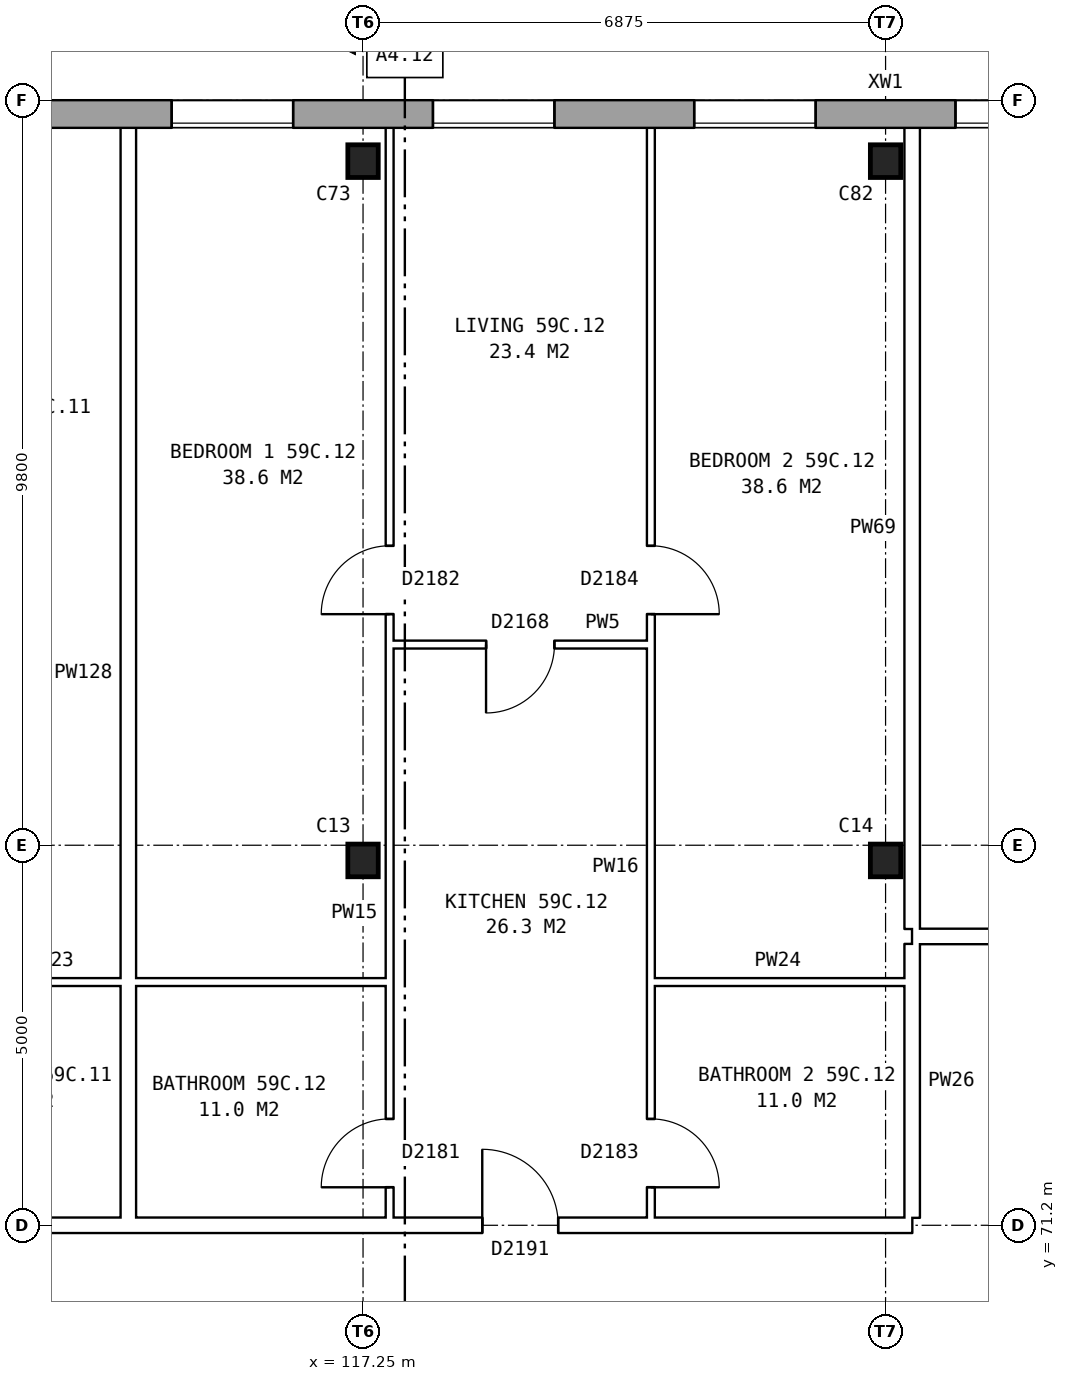
"""IFC4 building model, lengths in metres.
Left out: names, types, materials, properties, quantities, classifications, styles, units other than length and angle.
Written with IfcOpenShell. Run it as: python <this file> out.ifc"""

import sys

from ifc_helpers import new_model, si_unit, direction, frame, frame_2d, origin, origin_2d, place, context, subcontext, project, spatial, rectangle, i_section, extrude, element, fill, save


model = new_model("IFC4")
c1 = context("Model", 3, precision=1e-05, world=origin(), true_north=direction((0.0, 1.0)))
c2 = subcontext(c1, "Body", "Model", "MODEL_VIEW")
j1 = project(units=[si_unit("LENGTHUNIT", "METRE"), si_unit("PLANEANGLEUNIT", "RADIAN")], contexts=[c1])
p1 = place(None, origin())
s1 = spatial("IfcSite", under=j1, at=p1, CompositionType="ELEMENT")
p2 = place(p1, origin())
s2 = spatial("IfcBuilding", under=s1, at=p2, CompositionType="ELEMENT")
p3 = place(p2, frame((0.0, 0.0, 209.0)))
s3 = spatial("IfcBuildingStorey", under=s2, at=p3, CompositionType="ELEMENT", Elevation=209.0)
for number, where, z_axis, x_axis in (
    (1, (117.25, 76.0, 0.0), (0.0, 0.0, 1.0), (1.0, 0.0, 0.0)),
    (2, (124.125, 76.0, 0.0), (0.0, 0.0, 1.0), (1.0, 0.0, 0.0)),
    (3, (117.25, 85.2, 0.0), (0.0, 0.0, 1.0), (1.0, 0.0, 0.0)),
    (4, (124.125, 85.2, 0.0), (0.0, 0.0, 1.0), (1.0, 0.0, 0.0)),
):
    element("IfcColumn", number, at=place(p3, frame(where, z_axis=z_axis, x_axis=x_axis)), inside=s3, PredefinedType="COLUMN", context=c2, shape_type="SweptSolid", body=[
        extrude(i_section(OverallWidth=0.4, OverallDepth=0.43, WebThickness=0.04, FlangeThickness=0.04, at=origin_2d()), origin(), (0.0, 0.0, 1.0), 2.85),
    ])
p4 = place(p3, frame((131.05, 85.82, 0.0), z_axis=(0.0, 0.0, 1.0), x_axis=(-1.0, 0.0, 0.0)))
e5 = element("IfcWall", 5, at=p4, inside=s3, PredefinedType="STANDARD", context=c2, shape_type="SweptSolid", body=[
    extrude(rectangle(XDim=55.1, YDim=0.36, at=frame_2d((27.55, 0.0))), origin(), (0.0, 0.0, 1.0), 2.85),
])
p5 = place(p4, frame((0.969, 0.0, 0.8)))
e6 = element("IfcOpeningElement", 6, at=p5, cuts=e5, PredefinedType="OPENING", context=c2, shape_type="SweptSolid", body=[
    extrude(rectangle(XDim=1.6, YDim=1.8, at=frame_2d((0.8, 0.9))), frame((0.0, 0.19, 0.0), z_axis=(0.0, -1.0, 0.0), x_axis=(1.0, 0.0, 0.0)), (0.0, 0.0, 1.0), 0.38),
])
p6 = place(p4, frame((4.406, 0.0, 0.8)))
e7 = element("IfcOpeningElement", 7, at=p6, cuts=e5, PredefinedType="OPENING", context=c2, shape_type="SweptSolid", body=[
    extrude(rectangle(XDim=1.6, YDim=1.8, at=frame_2d((0.8, 0.9))), frame((0.0, 0.19, 0.0), z_axis=(0.0, -1.0, 0.0), x_axis=(1.0, 0.0, 0.0)), (0.0, 0.0, 1.0), 0.38),
])
p7 = place(p4, frame((7.844, 0.0, 0.8)))
e8 = element("IfcOpeningElement", 8, at=p7, cuts=e5, PredefinedType="OPENING", context=c2, shape_type="SweptSolid", body=[
    extrude(rectangle(XDim=1.6, YDim=1.8, at=frame_2d((0.8, 0.9))), frame((0.0, 0.19, 0.0), z_axis=(0.0, -1.0, 0.0), x_axis=(1.0, 0.0, 0.0)), (0.0, 0.0, 1.0), 0.38),
])
p8 = place(p4, frame((11.281, 0.0, 0.8)))
e9 = element("IfcOpeningElement", 9, at=p8, cuts=e5, PredefinedType="OPENING", context=c2, shape_type="SweptSolid", body=[
    extrude(rectangle(XDim=1.6, YDim=1.8, at=frame_2d((0.8, 0.9))), frame((0.0, 0.19, 0.0), z_axis=(0.0, -1.0, 0.0), x_axis=(1.0, 0.0, 0.0)), (0.0, 0.0, 1.0), 0.38),
])
p9 = place(p4, frame((14.719, 0.0, 0.8)))
e10 = element("IfcOpeningElement", 10, at=p9, cuts=e5, PredefinedType="OPENING", context=c2, shape_type="SweptSolid", body=[
    extrude(rectangle(XDim=1.6, YDim=1.8, at=frame_2d((0.8, 0.9))), frame((0.0, 0.19, 0.0), z_axis=(0.0, -1.0, 0.0), x_axis=(1.0, 0.0, 0.0)), (0.0, 0.0, 1.0), 0.38),
])
p10 = place(p4, frame((18.156, 0.0, 0.8)))
e11 = element("IfcOpeningElement", 11, at=p10, cuts=e5, PredefinedType="OPENING", context=c2, shape_type="SweptSolid", body=[
    extrude(rectangle(XDim=1.6, YDim=1.8, at=frame_2d((0.8, 0.9))), frame((0.0, 0.19, 0.0), z_axis=(0.0, -1.0, 0.0), x_axis=(1.0, 0.0, 0.0)), (0.0, 0.0, 1.0), 0.38),
])
p11 = place(p4, frame((21.594, 0.0, 0.8)))
e12 = element("IfcOpeningElement", 12, at=p11, cuts=e5, PredefinedType="OPENING", context=c2, shape_type="SweptSolid", body=[
    extrude(rectangle(XDim=1.6, YDim=1.8, at=frame_2d((0.8, 0.9))), frame((0.0, 0.19, 0.0), z_axis=(0.0, -1.0, 0.0), x_axis=(1.0, 0.0, 0.0)), (0.0, 0.0, 1.0), 0.38),
])
p12 = place(p4, frame((25.031, 0.0, 0.8)))
e13 = element("IfcOpeningElement", 13, at=p12, cuts=e5, PredefinedType="OPENING", context=c2, shape_type="SweptSolid", body=[
    extrude(rectangle(XDim=1.6, YDim=1.8, at=frame_2d((0.8, 0.9))), frame((0.0, 0.19, 0.0), z_axis=(0.0, -1.0, 0.0), x_axis=(1.0, 0.0, 0.0)), (0.0, 0.0, 1.0), 0.38),
])
p13 = place(p4, frame((28.469, 0.0, 0.8)))
e14 = element("IfcOpeningElement", 14, at=p13, cuts=e5, PredefinedType="OPENING", context=c2, shape_type="SweptSolid", body=[
    extrude(rectangle(XDim=1.6, YDim=1.8, at=frame_2d((0.8, 0.9))), frame((0.0, 0.19, 0.0), z_axis=(0.0, -1.0, 0.0), x_axis=(1.0, 0.0, 0.0)), (0.0, 0.0, 1.0), 0.38),
])
p14 = place(p4, frame((31.906, 0.0, 0.8)))
e15 = element("IfcOpeningElement", 15, at=p14, cuts=e5, PredefinedType="OPENING", context=c2, shape_type="SweptSolid", body=[
    extrude(rectangle(XDim=1.6, YDim=1.8, at=frame_2d((0.8, 0.9))), frame((0.0, 0.19, 0.0), z_axis=(0.0, -1.0, 0.0), x_axis=(1.0, 0.0, 0.0)), (0.0, 0.0, 1.0), 0.38),
])
p15 = place(p4, frame((35.344, 0.0, 0.8)))
e16 = element("IfcOpeningElement", 16, at=p15, cuts=e5, PredefinedType="OPENING", context=c2, shape_type="SweptSolid", body=[
    extrude(rectangle(XDim=1.6, YDim=1.8, at=frame_2d((0.8, 0.9))), frame((0.0, 0.19, 0.0), z_axis=(0.0, -1.0, 0.0), x_axis=(1.0, 0.0, 0.0)), (0.0, 0.0, 1.0), 0.38),
])
p16 = place(p4, frame((38.781, 0.0, 0.8)))
e17 = element("IfcOpeningElement", 17, at=p16, cuts=e5, PredefinedType="OPENING", context=c2, shape_type="SweptSolid", body=[
    extrude(rectangle(XDim=1.6, YDim=1.8, at=frame_2d((0.8, 0.9))), frame((0.0, 0.19, 0.0), z_axis=(0.0, -1.0, 0.0), x_axis=(1.0, 0.0, 0.0)), (0.0, 0.0, 1.0), 0.38),
])
p17 = place(p4, frame((42.219, 0.0, 0.8)))
e18 = element("IfcOpeningElement", 18, at=p17, cuts=e5, PredefinedType="OPENING", context=c2, shape_type="SweptSolid", body=[
    extrude(rectangle(XDim=1.6, YDim=1.8, at=frame_2d((0.8, 0.9))), frame((0.0, 0.19, 0.0), z_axis=(0.0, -1.0, 0.0), x_axis=(1.0, 0.0, 0.0)), (0.0, 0.0, 1.0), 0.38),
])
p18 = place(p4, frame((45.656, 0.0, 0.8)))
e19 = element("IfcOpeningElement", 19, at=p18, cuts=e5, PredefinedType="OPENING", context=c2, shape_type="SweptSolid", body=[
    extrude(rectangle(XDim=1.6, YDim=1.8, at=frame_2d((0.8, 0.9))), frame((0.0, 0.19, 0.0), z_axis=(0.0, -1.0, 0.0), x_axis=(1.0, 0.0, 0.0)), (0.0, 0.0, 1.0), 0.38),
])
p19 = place(p4, frame((49.094, 0.0, 0.8)))
e20 = element("IfcOpeningElement", 20, at=p19, cuts=e5, PredefinedType="OPENING", context=c2, shape_type="SweptSolid", body=[
    extrude(rectangle(XDim=1.6, YDim=1.8, at=frame_2d((0.8, 0.9))), frame((0.0, 0.19, 0.0), z_axis=(0.0, -1.0, 0.0), x_axis=(1.0, 0.0, 0.0)), (0.0, 0.0, 1.0), 0.38),
])
p20 = place(p4, frame((52.531, 0.0, 0.8)))
e21 = element("IfcOpeningElement", 21, at=p20, cuts=e5, PredefinedType="OPENING", context=c2, shape_type="SweptSolid", body=[
    extrude(rectangle(XDim=1.6, YDim=1.8, at=frame_2d((0.8, 0.9))), frame((0.0, 0.19, 0.0), z_axis=(0.0, -1.0, 0.0), x_axis=(1.0, 0.0, 0.0)), (0.0, 0.0, 1.0), 0.38),
])
p21 = place(p3, frame((83.225, 71.2, 0.0), z_axis=(0.0, 0.0, 1.0), x_axis=(1.0, 0.0, 0.0)))
e22 = element("IfcWall", 22, at=p21, inside=s3, PredefinedType="PARTITIONING", context=c2, shape_type="SweptSolid", body=[
    extrude(rectangle(XDim=41.25, YDim=0.2, at=frame_2d((20.625, 0.0))), origin(), (0.0, 0.0, 1.0), 2.85),
])
p22 = place(p21, frame((4.656, 0.0, 0.0)))
e23 = element("IfcOpeningElement", 23, at=p22, cuts=e22, PredefinedType="OPENING", context=c2, shape_type="SweptSolid", body=[
    extrude(rectangle(XDim=1.0, YDim=2.1, at=frame_2d((0.5, 1.05))), frame((0.0, 0.11, 0.0), z_axis=(0.0, -1.0, 0.0), x_axis=(1.0, 0.0, 0.0)), (0.0, 0.0, 1.0), 0.22),
])
p23 = place(p21, frame((14.969, 0.0, 0.0)))
e24 = element("IfcOpeningElement", 24, at=p23, cuts=e22, PredefinedType="OPENING", context=c2, shape_type="SweptSolid", body=[
    extrude(rectangle(XDim=1.0, YDim=2.1, at=frame_2d((0.5, 1.05))), frame((0.0, 0.11, 0.0), z_axis=(0.0, -1.0, 0.0), x_axis=(1.0, 0.0, 0.0)), (0.0, 0.0, 1.0), 0.22),
])
p24 = place(p21, frame((25.281, 0.0, 0.0)))
e25 = element("IfcOpeningElement", 25, at=p24, cuts=e22, PredefinedType="OPENING", context=c2, shape_type="SweptSolid", body=[
    extrude(rectangle(XDim=1.0, YDim=2.1, at=frame_2d((0.5, 1.05))), frame((0.0, 0.11, 0.0), z_axis=(0.0, -1.0, 0.0), x_axis=(1.0, 0.0, 0.0)), (0.0, 0.0, 1.0), 0.22),
])
p25 = place(p21, frame((35.594, 0.0, 0.0)))
e26 = element("IfcOpeningElement", 26, at=p25, cuts=e22, PredefinedType="OPENING", context=c2, shape_type="SweptSolid", body=[
    extrude(rectangle(XDim=1.0, YDim=2.1, at=frame_2d((0.5, 1.05))), frame((0.0, 0.11, 0.0), z_axis=(0.0, -1.0, 0.0), x_axis=(1.0, 0.0, 0.0)), (0.0, 0.0, 1.0), 0.22),
])
p26 = place(p3, frame((110.725, 74.4, 0.0), z_axis=(0.0, 0.0, 1.0), x_axis=(1.0, 0.0, 0.0)))
e27 = element("IfcWall", 27, at=p26, inside=s3, PredefinedType="PARTITIONING", context=c2, shape_type="SweptSolid", body=[
    extrude(rectangle(XDim=6.875, YDim=0.1, at=frame_2d((3.438, 0.0))), origin(), (0.0, 0.0, 1.0), 2.85),
])
p27 = place(p3, frame((121.037, 74.4, 0.0), z_axis=(0.0, 0.0, 1.0), x_axis=(1.0, 0.0, 0.0)))
e28 = element("IfcWall", 28, at=p27, inside=s3, PredefinedType="PARTITIONING", context=c2, shape_type="SweptSolid", body=[
    extrude(rectangle(XDim=3.338, YDim=0.1, at=frame_2d((1.669, 0.0))), origin(), (0.0, 0.0, 1.0), 2.85),
])
p28 = place(p3, frame((124.475, 75.0, 0.0), z_axis=(0.0, 0.0, 1.0), x_axis=(1.0, 0.0, 0.0)))
e29 = element("IfcWall", 29, at=p28, inside=s3, PredefinedType="PARTITIONING", context=c2, shape_type="SweptSolid", body=[
    extrude(rectangle(XDim=6.885, YDim=0.2, at=frame_2d((3.442, 0.0))), origin(), (0.0, 0.0, 1.0), 2.85),
])
p29 = place(p28, frame((2.992, 0.0, 0.0)))
e30 = element("IfcOpeningElement", 30, at=p29, cuts=e29, PredefinedType="OPENING", context=c2, shape_type="SweptSolid", body=[
    extrude(rectangle(XDim=0.9, YDim=2.1, at=frame_2d((0.45, 1.05))), frame((0.0, 0.11, 0.0), z_axis=(0.0, -1.0, 0.0), x_axis=(1.0, 0.0, 0.0)), (0.0, 0.0, 1.0), 0.22),
])
p30 = place(p3, frame((117.6, 78.84, 0.0), z_axis=(0.0, 0.0, 1.0), x_axis=(1.0, 0.0, 0.0)))
e31 = element("IfcWall", 31, at=p30, inside=s3, PredefinedType="PARTITIONING", context=c2, shape_type="SweptSolid", body=[
    extrude(rectangle(XDim=3.437, YDim=0.1, at=frame_2d((1.719, 0.0))), origin(), (0.0, 0.0, 1.0), 2.85),
])
p31 = place(p30, frame((1.269, 0.0, 0.0)))
e32 = element("IfcOpeningElement", 32, at=p31, cuts=e31, PredefinedType="OPENING", context=c2, shape_type="SweptSolid", body=[
    extrude(rectangle(XDim=0.9, YDim=2.1, at=frame_2d((0.45, 1.05))), frame((0.0, 0.06, 0.0), z_axis=(0.0, -1.0, 0.0), x_axis=(1.0, 0.0, 0.0)), (0.0, 0.0, 1.0), 0.12),
])
p32 = place(p3, frame((114.162, 71.3, 0.0), z_axis=(0.0, 0.0, 1.0), x_axis=(0.0, 1.0, 0.0)))
e33 = element("IfcWall", 33, at=p32, inside=s3, PredefinedType="PARTITIONING", context=c2, shape_type="SweptSolid", body=[
    extrude(rectangle(XDim=14.34, YDim=0.2, at=frame_2d((7.17, 0.0))), origin(), (0.0, 0.0, 1.0), 2.85),
])
p33 = place(p3, frame((117.6, 71.3, 0.0), z_axis=(0.0, 0.0, 1.0), x_axis=(0.0, 1.0, 0.0)))
e34 = element("IfcWall", 34, at=p33, inside=s3, PredefinedType="PARTITIONING", context=c2, shape_type="SweptSolid", body=[
    extrude(rectangle(XDim=14.34, YDim=0.1, at=frame_2d((7.17, 0.0))), origin(), (0.0, 0.0, 1.0), 2.85),
])
p34 = place(p33, frame((7.94, 0.0, 0.0)))
e35 = element("IfcOpeningElement", 35, at=p34, cuts=e34, PredefinedType="OPENING", context=c2, shape_type="SweptSolid", body=[
    extrude(rectangle(XDim=0.9, YDim=2.1, at=frame_2d((0.45, 1.05))), frame((0.0, 0.06, 0.0), z_axis=(0.0, -1.0, 0.0), x_axis=(1.0, 0.0, 0.0)), (0.0, 0.0, 1.0), 0.12),
])
p35 = place(p33, frame((0.4, 0.0, 0.0)))
e36 = element("IfcOpeningElement", 36, at=p35, cuts=e34, PredefinedType="OPENING", context=c2, shape_type="SweptSolid", body=[
    extrude(rectangle(XDim=0.9, YDim=2.1, at=frame_2d((0.45, 1.05))), frame((0.0, 0.06, 0.0), z_axis=(0.0, -1.0, 0.0), x_axis=(1.0, 0.0, 0.0)), (0.0, 0.0, 1.0), 0.12),
])
p36 = place(p3, frame((121.037, 71.3, 0.0), z_axis=(0.0, 0.0, 1.0), x_axis=(0.0, 1.0, 0.0)))
e37 = element("IfcWall", 37, at=p36, inside=s3, PredefinedType="PARTITIONING", context=c2, shape_type="SweptSolid", body=[
    extrude(rectangle(XDim=14.34, YDim=0.1, at=frame_2d((7.17, 0.0))), origin(), (0.0, 0.0, 1.0), 2.85),
])
p37 = place(p36, frame((7.94, 0.0, 0.0)))
e38 = element("IfcOpeningElement", 38, at=p37, cuts=e37, PredefinedType="OPENING", context=c2, shape_type="SweptSolid", body=[
    extrude(rectangle(XDim=0.9, YDim=2.1, at=frame_2d((0.45, 1.05))), frame((0.0, 0.06, 0.0), z_axis=(0.0, -1.0, 0.0), x_axis=(1.0, 0.0, 0.0)), (0.0, 0.0, 1.0), 0.12),
])
p38 = place(p36, frame((0.4, 0.0, 0.0)))
e39 = element("IfcOpeningElement", 39, at=p38, cuts=e37, PredefinedType="OPENING", context=c2, shape_type="SweptSolid", body=[
    extrude(rectangle(XDim=0.9, YDim=2.1, at=frame_2d((0.45, 1.05))), frame((0.0, 0.06, 0.0), z_axis=(0.0, -1.0, 0.0), x_axis=(1.0, 0.0, 0.0)), (0.0, 0.0, 1.0), 0.12),
])
p39 = place(p3, frame((124.475, 71.3, 0.0), z_axis=(0.0, 0.0, 1.0), x_axis=(0.0, 1.0, 0.0)))
e40 = element("IfcWall", 40, at=p39, inside=s3, PredefinedType="PARTITIONING", context=c2, shape_type="SweptSolid", body=[
    extrude(rectangle(XDim=3.6, YDim=0.2, at=frame_2d((1.8, 0.0))), origin(), (0.0, 0.0, 1.0), 2.85),
])
p40 = place(p3, frame((124.475, 75.1, 0.0), z_axis=(0.0, 0.0, 1.0), x_axis=(0.0, 1.0, 0.0)))
e41 = element("IfcWall", 41, at=p40, inside=s3, PredefinedType="PARTITIONING", context=c2, shape_type="SweptSolid", body=[
    extrude(rectangle(XDim=10.54, YDim=0.2, at=frame_2d((5.27, 0.0))), origin(), (0.0, 0.0, 1.0), 2.85),
])
p41 = place(p6, origin())
e42 = element("IfcWindow", 42, at=p41, inside=s3, PartitioningType="SINGLE_PANEL", PredefinedType="WINDOW", context=c2, shape_type="SweptSolid", body=[
    extrude(rectangle(XDim=1.6, YDim=1.8, at=frame_2d((0.8, 0.9))), frame((0.0, 0.15, 0.0), z_axis=(0.0, -1.0, 0.0), x_axis=(1.0, 0.0, 0.0)), (0.0, 0.0, 1.0), 0.06),
])
fill(e7, e42)
p42 = place(p7, origin())
e43 = element("IfcWindow", 43, at=p42, inside=s3, PartitioningType="SINGLE_PANEL", PredefinedType="WINDOW", context=c2, shape_type="SweptSolid", body=[
    extrude(rectangle(XDim=1.6, YDim=1.8, at=frame_2d((0.8, 0.9))), frame((0.0, 0.15, 0.0), z_axis=(0.0, -1.0, 0.0), x_axis=(1.0, 0.0, 0.0)), (0.0, 0.0, 1.0), 0.06),
])
fill(e8, e43)
p43 = place(p8, origin())
e44 = element("IfcWindow", 44, at=p43, inside=s3, PartitioningType="SINGLE_PANEL", PredefinedType="WINDOW", context=c2, shape_type="SweptSolid", body=[
    extrude(rectangle(XDim=1.6, YDim=1.8, at=frame_2d((0.8, 0.9))), frame((0.0, 0.15, 0.0), z_axis=(0.0, -1.0, 0.0), x_axis=(1.0, 0.0, 0.0)), (0.0, 0.0, 1.0), 0.06),
])
fill(e9, e44)
p44 = place(p9, origin())
e45 = element("IfcWindow", 45, at=p44, inside=s3, PartitioningType="SINGLE_PANEL", PredefinedType="WINDOW", context=c2, shape_type="SweptSolid", body=[
    extrude(rectangle(XDim=1.6, YDim=1.8, at=frame_2d((0.8, 0.9))), frame((0.0, 0.15, 0.0), z_axis=(0.0, -1.0, 0.0), x_axis=(1.0, 0.0, 0.0)), (0.0, 0.0, 1.0), 0.06),
])
fill(e10, e45)
p45 = place(p34, origin())
e46 = element("IfcDoor", 46, at=p45, inside=s3, OperationType="SINGLE_SWING_LEFT", PredefinedType="DOOR", context=c2, shape_type="SweptSolid", body=[
    extrude(rectangle(XDim=0.9, YDim=2.1, at=frame_2d((0.45, 1.05))), frame((0.0, 0.025, 0.0), z_axis=(0.0, -1.0, 0.0), x_axis=(1.0, 0.0, 0.0)), (0.0, 0.0, 1.0), 0.05),
])
fill(e35, e46)
p46 = place(p37, frame((0.9, 0.0, 0.0), z_axis=(0.0, 0.0, 1.0), x_axis=(-1.0, 0.0, 0.0)))
e47 = element("IfcDoor", 47, at=p46, inside=s3, OperationType="SINGLE_SWING_RIGHT", PredefinedType="DOOR", context=c2, shape_type="SweptSolid", body=[
    extrude(rectangle(XDim=0.9, YDim=2.1, at=frame_2d((0.45, 1.05))), frame((0.0, 0.025, 0.0), z_axis=(0.0, -1.0, 0.0), x_axis=(1.0, 0.0, 0.0)), (0.0, 0.0, 1.0), 0.05),
])
fill(e38, e47)
p47 = place(p25, origin())
e48 = element("IfcDoor", 48, at=p47, inside=s3, OperationType="SINGLE_SWING_LEFT", PredefinedType="DOOR", context=c2, shape_type="SweptSolid", body=[
    extrude(rectangle(XDim=1.0, YDim=2.1, at=frame_2d((0.5, 1.05))), frame((0.0, 0.025, 0.0), z_axis=(0.0, -1.0, 0.0), x_axis=(1.0, 0.0, 0.0)), (0.0, 0.0, 1.0), 0.05),
])
fill(e26, e48)
p48 = place(p31, frame((0.9, 0.0, 0.0), z_axis=(0.0, 0.0, 1.0), x_axis=(-1.0, 0.0, 0.0)))
e49 = element("IfcDoor", 49, at=p48, inside=s3, OperationType="SINGLE_SWING_RIGHT", PredefinedType="DOOR", context=c2, shape_type="SweptSolid", body=[
    extrude(rectangle(XDim=0.9, YDim=2.1, at=frame_2d((0.45, 1.05))), frame((0.0, 0.025, 0.0), z_axis=(0.0, -1.0, 0.0), x_axis=(1.0, 0.0, 0.0)), (0.0, 0.0, 1.0), 0.05),
])
fill(e32, e49)
p49 = place(p35, origin())
e50 = element("IfcDoor", 50, at=p49, inside=s3, OperationType="SINGLE_SWING_LEFT", PredefinedType="DOOR", context=c2, shape_type="SweptSolid", body=[
    extrude(rectangle(XDim=0.9, YDim=2.1, at=frame_2d((0.45, 1.05))), frame((0.0, 0.025, 0.0), z_axis=(0.0, -1.0, 0.0), x_axis=(1.0, 0.0, 0.0)), (0.0, 0.0, 1.0), 0.05),
])
fill(e36, e50)
p50 = place(p38, frame((0.9, 0.0, 0.0), z_axis=(0.0, 0.0, 1.0), x_axis=(-1.0, 0.0, 0.0)))
e51 = element("IfcDoor", 51, at=p50, inside=s3, OperationType="SINGLE_SWING_RIGHT", PredefinedType="DOOR", context=c2, shape_type="SweptSolid", body=[
    extrude(rectangle(XDim=0.9, YDim=2.1, at=frame_2d((0.45, 1.05))), frame((0.0, 0.025, 0.0), z_axis=(0.0, -1.0, 0.0), x_axis=(1.0, 0.0, 0.0)), (0.0, 0.0, 1.0), 0.05),
])
fill(e39, e51)
save(model, sys.argv[1])
